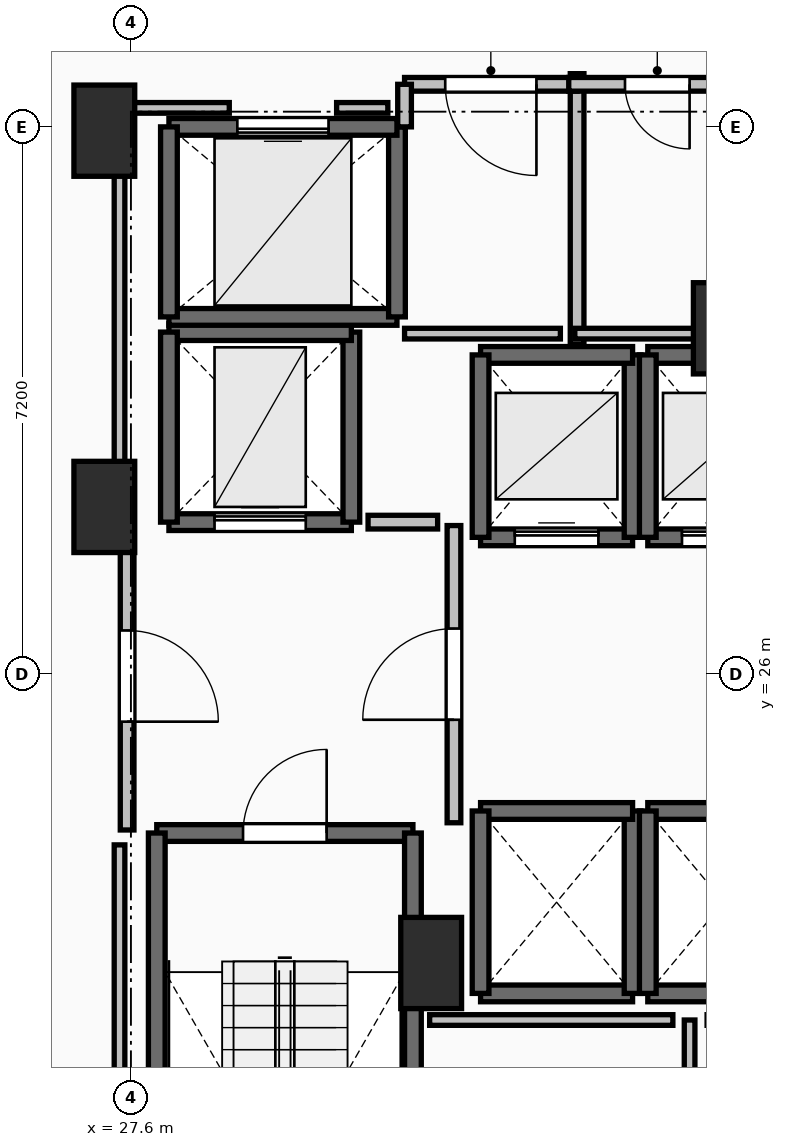
"""IFC4 building model, lengths in metres.
Left out: names, types, materials, properties, quantities, classifications, styles, units other than length and angle.
Written with IfcOpenShell. Run it as: python <this file> out.ifc"""

import sys

from ifc_helpers import new_model, si_unit, direction, frame, frame_2d, origin, origin_2d, place, context, subcontext, project, spatial, rectangle, extrude, element, fill, save


model = new_model("IFC4")
c1 = context("Model", 3, precision=1e-05, world=origin(), true_north=direction((0.0, 1.0)))
c2 = subcontext(c1, "Body", "Model", "MODEL_VIEW")
j1 = project(units=[si_unit("LENGTHUNIT", "METRE"), si_unit("PLANEANGLEUNIT", "RADIAN")], contexts=[c1])
p1 = place(None, origin())
s1 = spatial("IfcSite", under=j1, at=p1, CompositionType="ELEMENT")
p2 = place(p1, origin())
s2 = spatial("IfcBuilding", under=s1, at=p2, CompositionType="ELEMENT")
p3 = place(p2, frame((0.0, 0.0, 9.6)))
s3 = spatial("IfcBuildingStorey", under=s2, at=p3, CompositionType="ELEMENT", Elevation=9.6)
for number, where, z_axis, x_axis in (
    (1, (27.25, 28.2, 0.0), (0.0, 0.0, 1.0), (1.0, 0.0, 0.0)),
    (2, (27.25, 33.15, 0.0), (0.0, 0.0, 1.0), (1.0, 0.0, 0.0)),
    (3, (31.55, 22.2, 0.0), (0.0, 0.0, 1.0), (1.0, 0.0, 0.0)),
    (4, (35.4, 30.55, 0.0), (0.0, 0.0, 1.0), (1.0, 0.0, 0.0)),
):
    element("IfcColumn", number, at=place(p3, frame(where, z_axis=z_axis, x_axis=x_axis)), inside=s3, PredefinedType="PILASTER", context=c2, shape_type="SweptSolid", body=[
        extrude(rectangle(XDim=0.8, YDim=1.2, at=origin_2d()), origin(), (0.0, 0.0, 1.0), 4.8),
    ])
p4 = place(p3, frame((27.94, 23.91, 0.0), z_axis=(0.0, 0.0, 1.0), x_axis=(1.0, 0.0, 0.0)))
e5 = element("IfcWall", 5, at=p4, inside=s3, PredefinedType="SOLIDWALL", context=c2, shape_type="SweptSolid", body=[
    extrude(rectangle(XDim=3.37, YDim=0.22, at=frame_2d((1.685, 0.0))), origin(), (0.0, 0.0, 1.0), 4.48),
])
p5 = place(p4, frame((1.135, 0.0, 0.0)))
e6 = element("IfcOpeningElement", 6, at=p5, cuts=e5, PredefinedType="OPENING", context=c2, shape_type="SweptSolid", body=[
    extrude(rectangle(XDim=1.1, YDim=2.15, at=frame_2d((0.55, 1.075))), frame((0.0, 0.125, 0.0), z_axis=(0.0, -1.0, 0.0), x_axis=(1.0, 0.0, 0.0)), (0.0, 0.0, 1.0), 0.25),
])
for number, where, z_axis, x_axis in (
    (7, (31.31, 23.91, 0.0), (0.0, 0.0, 1.0), (0.0, -1.0, 0.0)),
    (8, (27.94, 16.49, 0.0), (0.0, 0.0, 1.0), (0.0, 1.0, 0.0)),
):
    element("IfcWall", number, at=place(p3, frame(where, z_axis=z_axis, x_axis=x_axis)), inside=s3, PredefinedType="SOLIDWALL", context=c2, shape_type="SweptSolid", body=[
        extrude(rectangle(XDim=7.42, YDim=0.22, at=frame_2d((3.71, 0.0))), origin(), (0.0, 0.0, 1.0), 4.48),
    ])
p6 = place(p3, frame((32.2, 27.8, 0.0), z_axis=(0.0, 0.0, 1.0), x_axis=(1.0, 0.0, 0.0)))
e9 = element("IfcWall", 9, at=p6, inside=s3, PredefinedType="SOLIDWALL", context=c2, shape_type="SweptSolid", body=[
    extrude(rectangle(XDim=2.0, YDim=0.22, at=frame_2d((1.0, 0.0))), origin(), (0.0, 0.0, 1.0), 4.48),
])
p7 = place(p6, frame((0.45, 0.0, 0.0)))
e10 = element("IfcOpeningElement", 10, at=p7, cuts=e9, PredefinedType="OPENING", context=c2, shape_type="SweptSolid", body=[
    extrude(rectangle(XDim=1.1, YDim=2.2, at=frame_2d((0.55, 1.1))), frame((0.0, 0.125, 0.0), z_axis=(0.0, -1.0, 0.0), x_axis=(1.0, 0.0, 0.0)), (0.0, 0.0, 1.0), 0.25),
])
p8 = place(p3, frame((34.2, 27.8, 0.0), z_axis=(0.0, 0.0, 1.0), x_axis=(0.0, 1.0, 0.0)))
e11 = element("IfcWall", 11, at=p8, inside=s3, PredefinedType="SOLIDWALL", context=c2, shape_type="SweptSolid", body=[
    extrude(rectangle(XDim=2.4, YDim=0.22, at=frame_2d((1.2, 0.0))), origin(), (0.0, 0.0, 1.0), 4.48),
])
p9 = place(p3, frame((34.2, 30.2, 0.0), z_axis=(0.0, 0.0, 1.0), x_axis=(-1.0, 0.0, 0.0)))
e12 = element("IfcWall", 12, at=p9, inside=s3, PredefinedType="SOLIDWALL", context=c2, shape_type="SweptSolid", body=[
    extrude(rectangle(XDim=2.0, YDim=0.22, at=frame_2d((1.0, 0.0))), origin(), (0.0, 0.0, 1.0), 4.48),
])
p10 = place(p3, frame((32.2, 30.2, 0.0), z_axis=(0.0, 0.0, 1.0), x_axis=(0.0, -1.0, 0.0)))
e13 = element("IfcWall", 13, at=p10, inside=s3, PredefinedType="SOLIDWALL", context=c2, shape_type="SweptSolid", body=[
    extrude(rectangle(XDim=2.4, YDim=0.22, at=frame_2d((1.2, 0.0))), origin(), (0.0, 0.0, 1.0), 4.48),
])
p11 = place(p3, frame((34.4, 27.8, 0.0), z_axis=(0.0, 0.0, 1.0), x_axis=(1.0, 0.0, 0.0)))
e14 = element("IfcWall", 14, at=p11, inside=s3, PredefinedType="SOLIDWALL", context=c2, shape_type="SweptSolid", body=[
    extrude(rectangle(XDim=2.0, YDim=0.22, at=frame_2d((1.0, 0.0))), origin(), (0.0, 0.0, 1.0), 4.48),
])
p12 = place(p11, frame((0.45, 0.0, 0.0)))
e15 = element("IfcOpeningElement", 15, at=p12, cuts=e14, PredefinedType="OPENING", context=c2, shape_type="SweptSolid", body=[
    extrude(rectangle(XDim=1.1, YDim=2.2, at=frame_2d((0.55, 1.1))), frame((0.0, 0.125, 0.0), z_axis=(0.0, -1.0, 0.0), x_axis=(1.0, 0.0, 0.0)), (0.0, 0.0, 1.0), 0.25),
])
p13 = place(p3, frame((36.4, 30.2, 0.0), z_axis=(0.0, 0.0, 1.0), x_axis=(-1.0, 0.0, 0.0)))
e16 = element("IfcWall", 16, at=p13, inside=s3, PredefinedType="SOLIDWALL", context=c2, shape_type="SweptSolid", body=[
    extrude(rectangle(XDim=2.0, YDim=0.22, at=frame_2d((1.0, 0.0))), origin(), (0.0, 0.0, 1.0), 4.48),
])
p14 = place(p3, frame((34.4, 30.2, 0.0), z_axis=(0.0, 0.0, 1.0), x_axis=(0.0, -1.0, 0.0)))
e17 = element("IfcWall", 17, at=p14, inside=s3, PredefinedType="SOLIDWALL", context=c2, shape_type="SweptSolid", body=[
    extrude(rectangle(XDim=2.4, YDim=0.22, at=frame_2d((1.2, 0.0))), origin(), (0.0, 0.0, 1.0), 4.48),
])
p15 = place(p3, frame((32.2, 21.8, 0.0), z_axis=(0.0, 0.0, 1.0), x_axis=(1.0, 0.0, 0.0)))
e18 = element("IfcWall", 18, at=p15, inside=s3, PredefinedType="SOLIDWALL", context=c2, shape_type="SweptSolid", body=[
    extrude(rectangle(XDim=2.0, YDim=0.22, at=frame_2d((1.0, 0.0))), origin(), (0.0, 0.0, 1.0), 4.48),
])
p16 = place(p3, frame((34.2, 21.8, 0.0), z_axis=(0.0, 0.0, 1.0), x_axis=(0.0, 1.0, 0.0)))
e19 = element("IfcWall", 19, at=p16, inside=s3, PredefinedType="SOLIDWALL", context=c2, shape_type="SweptSolid", body=[
    extrude(rectangle(XDim=2.4, YDim=0.22, at=frame_2d((1.2, 0.0))), origin(), (0.0, 0.0, 1.0), 4.48),
])
p17 = place(p3, frame((34.2, 24.2, 0.0), z_axis=(0.0, 0.0, 1.0), x_axis=(-1.0, 0.0, 0.0)))
e20 = element("IfcWall", 20, at=p17, inside=s3, PredefinedType="SOLIDWALL", context=c2, shape_type="SweptSolid", body=[
    extrude(rectangle(XDim=2.0, YDim=0.22, at=frame_2d((1.0, 0.0))), origin(), (0.0, 0.0, 1.0), 4.48),
])
p18 = place(p3, frame((32.2, 24.2, 0.0), z_axis=(0.0, 0.0, 1.0), x_axis=(0.0, -1.0, 0.0)))
e21 = element("IfcWall", 21, at=p18, inside=s3, PredefinedType="SOLIDWALL", context=c2, shape_type="SweptSolid", body=[
    extrude(rectangle(XDim=2.4, YDim=0.22, at=frame_2d((1.2, 0.0))), origin(), (0.0, 0.0, 1.0), 4.48),
])
for number, where, z_axis, x_axis in (
    (22, (34.4, 21.8, 0.0), (0.0, 0.0, 1.0), (1.0, 0.0, 0.0)),
    (23, (36.4, 24.2, 0.0), (0.0, 0.0, 1.0), (-1.0, 0.0, 0.0)),
):
    element("IfcWall", number, at=place(p3, frame(where, z_axis=z_axis, x_axis=x_axis)), inside=s3, PredefinedType="SOLIDWALL", context=c2, shape_type="SweptSolid", body=[
        extrude(rectangle(XDim=2.0, YDim=0.22, at=frame_2d((1.0, 0.0))), origin(), (0.0, 0.0, 1.0), 4.48),
    ])
p19 = place(p3, frame((34.4, 24.2, 0.0), z_axis=(0.0, 0.0, 1.0), x_axis=(0.0, -1.0, 0.0)))
e24 = element("IfcWall", 24, at=p19, inside=s3, PredefinedType="SOLIDWALL", context=c2, shape_type="SweptSolid", body=[
    extrude(rectangle(XDim=2.4, YDim=0.22, at=frame_2d((1.2, 0.0))), origin(), (0.0, 0.0, 1.0), 4.48),
])
p20 = place(p3, frame((28.1, 28.0, 0.0), z_axis=(0.0, 0.0, 1.0), x_axis=(1.0, 0.0, 0.0)))
e25 = element("IfcWall", 25, at=p20, inside=s3, PredefinedType="SHEAR", context=c2, shape_type="SweptSolid", body=[
    extrude(rectangle(XDim=2.4, YDim=0.22, at=frame_2d((1.2, 0.0))), origin(), (0.0, 0.0, 1.0), 4.48),
])
p21 = place(p20, frame((0.6, 0.0, 0.0)))
e26 = element("IfcOpeningElement", 26, at=p21, cuts=e25, PredefinedType="OPENING", context=c2, shape_type="SweptSolid", body=[
    extrude(rectangle(XDim=1.2, YDim=2.2, at=frame_2d((0.6, 1.1))), frame((0.0, 0.125, 0.0), z_axis=(0.0, -1.0, 0.0), x_axis=(1.0, 0.0, 0.0)), (0.0, 0.0, 1.0), 0.25),
])
p22 = place(p3, frame((30.5, 28.0, 0.0), z_axis=(0.0, 0.0, 1.0), x_axis=(0.0, 1.0, 0.0)))
e27 = element("IfcWall", 27, at=p22, inside=s3, PredefinedType="SHEAR", context=c2, shape_type="SweptSolid", body=[
    extrude(rectangle(XDim=2.5, YDim=0.22, at=frame_2d((1.25, 0.0))), origin(), (0.0, 0.0, 1.0), 4.48),
])
p23 = place(p3, frame((30.5, 30.5, 0.0), z_axis=(0.0, 0.0, 1.0), x_axis=(-1.0, 0.0, 0.0)))
e28 = element("IfcWall", 28, at=p23, inside=s3, PredefinedType="SHEAR", context=c2, shape_type="SweptSolid", body=[
    extrude(rectangle(XDim=2.4, YDim=0.22, at=frame_2d((1.2, 0.0))), origin(), (0.0, 0.0, 1.0), 4.48),
])
p24 = place(p3, frame((28.1, 30.5, 0.0), z_axis=(0.0, 0.0, 1.0), x_axis=(0.0, -1.0, 0.0)))
e29 = element("IfcWall", 29, at=p24, inside=s3, PredefinedType="SHEAR", context=c2, shape_type="SweptSolid", body=[
    extrude(rectangle(XDim=2.5, YDim=0.22, at=frame_2d((1.25, 0.0))), origin(), (0.0, 0.0, 1.0), 4.48),
])
p25 = place(p3, frame((28.1, 30.7, 0.0), z_axis=(0.0, 0.0, 1.0), x_axis=(1.0, 0.0, 0.0)))
e30 = element("IfcWall", 30, at=p25, inside=s3, PredefinedType="SOLIDWALL", context=c2, shape_type="SweptSolid", body=[
    extrude(rectangle(XDim=3.0, YDim=0.22, at=frame_2d((1.5, 0.0))), origin(), (0.0, 0.0, 1.0), 4.48),
])
p26 = place(p3, frame((31.1, 30.7, 0.0), z_axis=(0.0, 0.0, 1.0), x_axis=(0.0, 1.0, 0.0)))
e31 = element("IfcWall", 31, at=p26, inside=s3, PredefinedType="SOLIDWALL", context=c2, shape_type="SweptSolid", body=[
    extrude(rectangle(XDim=2.5, YDim=0.22, at=frame_2d((1.25, 0.0))), origin(), (0.0, 0.0, 1.0), 4.48),
])
p27 = place(p3, frame((31.1, 33.2, 0.0), z_axis=(0.0, 0.0, 1.0), x_axis=(-1.0, 0.0, 0.0)))
e32 = element("IfcWall", 32, at=p27, inside=s3, PredefinedType="SOLIDWALL", context=c2, shape_type="SweptSolid", body=[
    extrude(rectangle(XDim=3.0, YDim=0.22, at=frame_2d((1.5, 0.0))), origin(), (0.0, 0.0, 1.0), 4.48),
])
p28 = place(p27, frame((0.9, 0.0, 0.0)))
e33 = element("IfcOpeningElement", 33, at=p28, cuts=e32, PredefinedType="OPENING", context=c2, shape_type="SweptSolid", body=[
    extrude(rectangle(XDim=1.2, YDim=2.2, at=frame_2d((0.6, 1.1))), frame((0.0, 0.125, 0.0), z_axis=(0.0, -1.0, 0.0), x_axis=(1.0, 0.0, 0.0)), (0.0, 0.0, 1.0), 0.25),
])
p29 = place(p3, frame((28.1, 33.2, 0.0), z_axis=(0.0, 0.0, 1.0), x_axis=(0.0, -1.0, 0.0)))
e34 = element("IfcWall", 34, at=p29, inside=s3, PredefinedType="SOLIDWALL", context=c2, shape_type="SweptSolid", body=[
    extrude(rectangle(XDim=2.5, YDim=0.22, at=frame_2d((1.25, 0.0))), origin(), (0.0, 0.0, 1.0), 4.48),
])
p30 = place(p3, frame((31.85, 24.045, 0.0), z_axis=(0.0, 0.0, 1.0), x_axis=(0.0, 1.0, 0.0)))
e35 = element("IfcWall", 35, at=p30, inside=s3, PredefinedType="PARTITIONING", context=c2, shape_type="SweptSolid", body=[
    extrude(rectangle(XDim=3.91, YDim=0.18, at=frame_2d((1.955, 0.0))), origin(), (0.0, 0.0, 1.0), 4.48),
])
p31 = place(p30, frame((1.355, 0.0, 0.0)))
e36 = element("IfcOpeningElement", 36, at=p31, cuts=e35, PredefinedType="OPENING", context=c2, shape_type="SweptSolid", body=[
    extrude(rectangle(XDim=1.2, YDim=2.15, at=frame_2d((0.6, 1.075))), frame((0.0, 0.105, 0.0), z_axis=(0.0, -1.0, 0.0), x_axis=(1.0, 0.0, 0.0)), (0.0, 0.0, 1.0), 0.21),
])
p32 = place(p3, frame((27.55, 28.0, 0.0), z_axis=(0.0, 0.0, 1.0), x_axis=(0.0, -1.0, 0.0)))
e37 = element("IfcWall", 37, at=p32, inside=s3, PredefinedType="PARTITIONING", context=c2, shape_type="SweptSolid", body=[
    extrude(rectangle(XDim=4.05, YDim=0.18, at=frame_2d((2.025, 0.0))), origin(), (0.0, 0.0, 1.0), 4.48),
])
p33 = place(p32, frame((1.425, 0.0, 0.0)))
e38 = element("IfcOpeningElement", 38, at=p33, cuts=e37, PredefinedType="OPENING", context=c2, shape_type="SweptSolid", body=[
    extrude(rectangle(XDim=1.2, YDim=2.15, at=frame_2d((0.6, 1.075))), frame((0.0, 0.105, 0.0), z_axis=(0.0, -1.0, 0.0), x_axis=(1.0, 0.0, 0.0)), (0.0, 0.0, 1.0), 0.21),
])
p34 = place(p3, frame((33.47, 30.34, 0.0), z_axis=(0.0, 0.0, 1.0), x_axis=(0.0, 1.0, 0.0)))
e39 = element("IfcWall", 39, at=p34, inside=s3, PredefinedType="PARTITIONING", context=c2, shape_type="SweptSolid", body=[
    extrude(rectangle(XDim=3.56, YDim=0.18, at=frame_2d((1.78, 0.0))), origin(), (0.0, 0.0, 1.0), 4.48),
])
p35 = place(p3, frame((33.47, 33.76, 0.0), z_axis=(0.0, 0.0, 1.0), x_axis=(-1.0, 0.0, 0.0)))
e40 = element("IfcWall", 40, at=p35, inside=s3, PredefinedType="PARTITIONING", context=c2, shape_type="SweptSolid", body=[
    extrude(rectangle(XDim=2.27, YDim=0.18, at=frame_2d((1.135, 0.0))), origin(), (0.0, 0.0, 1.0), 4.48),
])
p36 = place(p35, frame((0.535, 0.0, 0.0)))
e41 = element("IfcOpeningElement", 41, at=p36, cuts=e40, PredefinedType="OPENING", context=c2, shape_type="SweptSolid", body=[
    extrude(rectangle(XDim=1.2, YDim=2.15, at=frame_2d((0.6, 1.075))), frame((0.0, 0.105, 0.0), z_axis=(0.0, -1.0, 0.0), x_axis=(1.0, 0.0, 0.0)), (0.0, 0.0, 1.0), 0.21),
])
p37 = place(p3, frame((31.2, 33.76, 0.0), z_axis=(0.0, 0.0, 1.0), x_axis=(0.0, -1.0, 0.0)))
e42 = element("IfcWall", 42, at=p37, inside=s3, PredefinedType="PARTITIONING", context=c2, shape_type="SweptSolid", body=[
    extrude(rectangle(XDim=0.56, YDim=0.18, at=frame_2d((0.28, 0.0))), origin(), (0.0, 0.0, 1.0), 4.48),
])
p38 = place(p3, frame((35.69, 33.76, 0.0), z_axis=(0.0, 0.0, 1.0), x_axis=(-1.0, 0.0, 0.0)))
e43 = element("IfcWall", 43, at=p38, inside=s3, PredefinedType="PARTITIONING", context=c2, shape_type="SweptSolid", body=[
    extrude(rectangle(XDim=2.33, YDim=0.18, at=frame_2d((1.165, 0.0))), origin(), (0.0, 0.0, 1.0), 4.48),
])
p39 = place(p38, frame((0.74, 0.0, 0.0)))
e44 = element("IfcOpeningElement", 44, at=p39, cuts=e43, PredefinedType="OPENING", context=c2, shape_type="SweptSolid", body=[
    extrude(rectangle(XDim=0.85, YDim=2.1, at=frame_2d((0.425, 1.05))), frame((0.0, 0.105, 0.0), z_axis=(0.0, -1.0, 0.0), x_axis=(1.0, 0.0, 0.0)), (0.0, 0.0, 1.0), 0.21),
])
p40 = place(p3, frame((34.95, 16.32, 0.0), z_axis=(0.0, 0.0, 1.0), x_axis=(0.0, 1.0, 0.0)))
e45 = element("IfcWall", 45, at=p40, inside=s3, PredefinedType="PARTITIONING", context=c2, shape_type="SweptSolid", body=[
    extrude(rectangle(XDim=5.13, YDim=0.14, at=frame_2d((2.565, 0.0))), origin(), (0.0, 0.0, 1.0), 4.48),
])
p41 = place(p3, frame((31.635, 28.0, 0.0), z_axis=(0.0, 0.0, 1.0), x_axis=(-1.0, 0.0, 0.0)))
e46 = element("IfcWall", 46, at=p41, inside=s3, PredefinedType="PARTITIONING", context=c2, shape_type="SweptSolid", body=[
    extrude(rectangle(XDim=0.915, YDim=0.18, at=frame_2d((0.458, 0.0))), origin(), (0.0, 0.0, 1.0), 4.48),
])
p42 = place(p3, frame((31.2, 30.48, 0.0), z_axis=(0.0, 0.0, 1.0), x_axis=(1.0, 0.0, 0.0)))
e47 = element("IfcWall", 47, at=p42, inside=s3, PredefinedType="PARTITIONING", context=c2, shape_type="SweptSolid", body=[
    extrude(rectangle(XDim=2.05, YDim=0.14, at=frame_2d((1.025, 0.0))), origin(), (0.0, 0.0, 1.0), 4.48),
])
p43 = place(p3, frame((33.44, 30.48, 0.0), z_axis=(0.0, 0.0, 1.0), x_axis=(1.0, 0.0, 0.0)))
e48 = element("IfcWall", 48, at=p43, inside=s3, PredefinedType="PARTITIONING", context=c2, shape_type="SweptSolid", body=[
    extrude(rectangle(XDim=2.14, YDim=0.14, at=frame_2d((1.07, 0.0))), origin(), (0.0, 0.0, 1.0), 3.672),
])
p44 = place(p3, frame((34.73, 21.45, 0.0), z_axis=(0.0, 0.0, 1.0), x_axis=(-1.0, 0.0, 0.0)))
e49 = element("IfcWall", 49, at=p44, inside=s3, PredefinedType="PARTITIONING", context=c2, shape_type="SweptSolid", body=[
    extrude(rectangle(XDim=3.2, YDim=0.14, at=frame_2d((1.6, 0.0))), origin(), (0.0, 0.0, 1.0), 4.48),
])
p45 = place(p3, frame((27.45, 16.24, 0.0), z_axis=(0.0, 0.0, 1.0), x_axis=(0.0, 1.0, 0.0)))
e50 = element("IfcWall", 50, at=p45, inside=s3, PredefinedType="PARTITIONING", context=c2, shape_type="SweptSolid", body=[
    extrude(rectangle(XDim=7.514, YDim=0.14, at=frame_2d((3.757, 0.0))), origin(), (0.0, 0.0, 1.0), 2.406),
])
p46 = place(p3, frame((27.45, 28.196, 0.0), z_axis=(0.0, 0.0, 1.0), x_axis=(0.0, 1.0, 0.0)))
e51 = element("IfcWall", 51, at=p46, inside=s3, PredefinedType="PARTITIONING", context=c2, shape_type="SweptSolid", body=[
    extrude(rectangle(XDim=5.254, YDim=0.14, at=frame_2d((2.627, 0.0))), origin(), (0.0, 0.0, 1.0), 3.672),
])
p47 = place(p3, frame((27.45, 33.45, 0.0), z_axis=(0.0, 0.0, 1.0), x_axis=(1.0, 0.0, 0.0)))
e52 = element("IfcWall", 52, at=p47, inside=s3, PredefinedType="PARTITIONING", context=c2, shape_type="SweptSolid", body=[
    extrude(rectangle(XDim=1.444, YDim=0.14, at=frame_2d((0.722, 0.0))), origin(), (0.0, 0.0, 1.0), 3.672),
])
p48 = place(p3, frame((30.306, 33.45, 0.0), z_axis=(0.0, 0.0, 1.0), x_axis=(1.0, 0.0, 0.0)))
e53 = element("IfcWall", 53, at=p48, inside=s3, PredefinedType="PARTITIONING", context=c2, shape_type="SweptSolid", body=[
    extrude(rectangle(XDim=0.674, YDim=0.14, at=frame_2d((0.337, 0.0))), origin(), (0.0, 0.0, 1.0), 4.48),
])
p49 = place(p5, origin())
e54 = element("IfcDoor", 54, at=p49, inside=s3, OperationType="SINGLE_SWING_RIGHT", PredefinedType="DOOR", context=c2, shape_type="SweptSolid", body=[
    extrude(rectangle(XDim=1.1, YDim=2.15, at=frame_2d((0.55, 1.075))), frame((0.0, 0.025, 0.0), z_axis=(0.0, -1.0, 0.0), x_axis=(1.0, 0.0, 0.0)), (0.0, 0.0, 1.0), 0.05),
])
fill(e6, e54)
p50 = place(p7, origin())
e55 = element("IfcDoor", 55, at=p50, inside=s3, OperationType="SLIDING_TO_LEFT", PredefinedType="DOOR", context=c2, shape_type="SweptSolid", body=[
    extrude(rectangle(XDim=1.1, YDim=2.2, at=frame_2d((0.55, 1.1))), frame((0.0, 0.025, 0.0), z_axis=(0.0, -1.0, 0.0), x_axis=(1.0, 0.0, 0.0)), (0.0, 0.0, 1.0), 0.05),
])
fill(e10, e55)
p51 = place(p12, origin())
e56 = element("IfcDoor", 56, at=p51, inside=s3, OperationType="SLIDING_TO_LEFT", PredefinedType="DOOR", context=c2, shape_type="SweptSolid", body=[
    extrude(rectangle(XDim=1.1, YDim=2.2, at=frame_2d((0.55, 1.1))), frame((0.0, 0.025, 0.0), z_axis=(0.0, -1.0, 0.0), x_axis=(1.0, 0.0, 0.0)), (0.0, 0.0, 1.0), 0.05),
])
fill(e15, e56)
p52 = place(p21, origin())
e57 = element("IfcDoor", 57, at=p52, inside=s3, OperationType="SLIDING_TO_LEFT", PredefinedType="DOOR", context=c2, shape_type="SweptSolid", body=[
    extrude(rectangle(XDim=1.2, YDim=2.2, at=frame_2d((0.6, 1.1))), frame((0.0, 0.025, 0.0), z_axis=(0.0, -1.0, 0.0), x_axis=(1.0, 0.0, 0.0)), (0.0, 0.0, 1.0), 0.05),
])
fill(e26, e57)
p53 = place(p28, origin())
e58 = element("IfcDoor", 58, at=p53, inside=s3, OperationType="SLIDING_TO_LEFT", PredefinedType="DOOR", context=c2, shape_type="SweptSolid", body=[
    extrude(rectangle(XDim=1.2, YDim=2.2, at=frame_2d((0.6, 1.1))), frame((0.0, 0.025, 0.0), z_axis=(0.0, -1.0, 0.0), x_axis=(1.0, 0.0, 0.0)), (0.0, 0.0, 1.0), 0.05),
])
fill(e33, e58)
p54 = place(p31, origin())
e59 = element("IfcDoor", 59, at=p54, inside=s3, OperationType="SINGLE_SWING_LEFT", PredefinedType="DOOR", context=c2, shape_type="SweptSolid", body=[
    extrude(rectangle(XDim=1.2, YDim=2.15, at=frame_2d((0.6, 1.075))), frame((0.0, 0.025, 0.0), z_axis=(0.0, -1.0, 0.0), x_axis=(1.0, 0.0, 0.0)), (0.0, 0.0, 1.0), 0.05),
])
fill(e36, e59)
p55 = place(p33, origin())
e60 = element("IfcDoor", 60, at=p55, inside=s3, OperationType="SINGLE_SWING_RIGHT", PredefinedType="DOOR", context=c2, shape_type="SweptSolid", body=[
    extrude(rectangle(XDim=1.2, YDim=2.15, at=frame_2d((0.6, 1.075))), frame((0.0, 0.025, 0.0), z_axis=(0.0, -1.0, 0.0), x_axis=(1.0, 0.0, 0.0)), (0.0, 0.0, 1.0), 0.05),
])
fill(e38, e60)
p56 = place(p36, origin())
e61 = element("IfcDoor", 61, at=p56, inside=s3, OperationType="SINGLE_SWING_LEFT", PredefinedType="DOOR", context=c2, shape_type="SweptSolid", body=[
    extrude(rectangle(XDim=1.2, YDim=2.15, at=frame_2d((0.6, 1.075))), frame((0.0, 0.025, 0.0), z_axis=(0.0, -1.0, 0.0), x_axis=(1.0, 0.0, 0.0)), (0.0, 0.0, 1.0), 0.05),
])
fill(e41, e61)
p57 = place(p39, origin())
e62 = element("IfcDoor", 62, at=p57, inside=s3, OperationType="SINGLE_SWING_LEFT", PredefinedType="DOOR", context=c2, shape_type="SweptSolid", body=[
    extrude(rectangle(XDim=0.85, YDim=2.1, at=frame_2d((0.425, 1.05))), frame((0.0, 0.025, 0.0), z_axis=(0.0, -1.0, 0.0), x_axis=(1.0, 0.0, 0.0)), (0.0, 0.0, 1.0), 0.05),
])
fill(e44, e62)
save(model, sys.argv[1])
